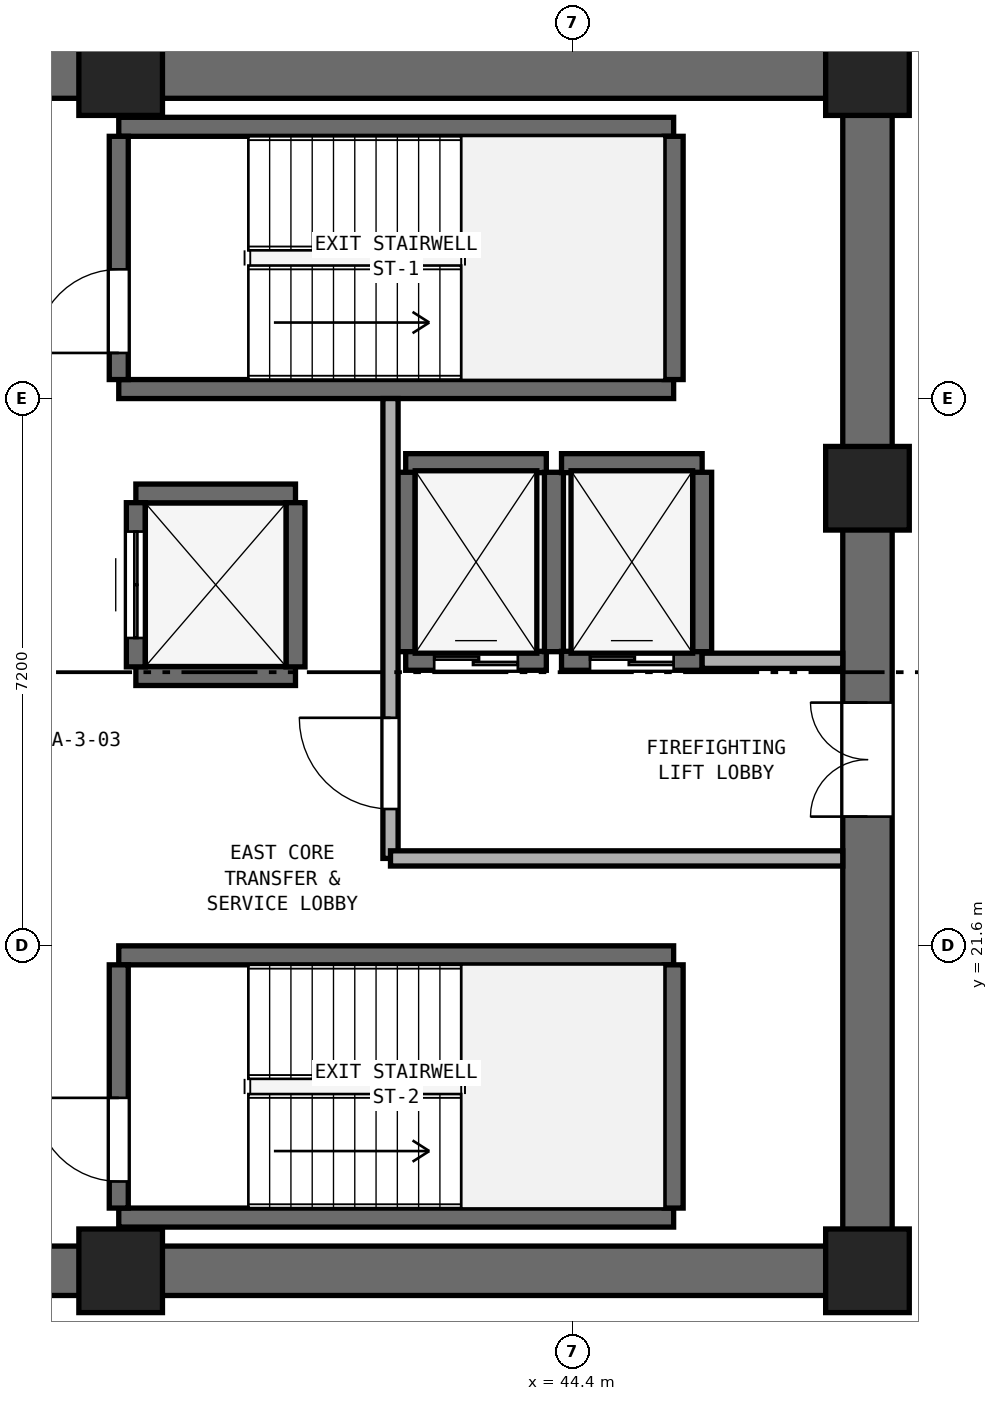
"""IFC4 building model, lengths in metres.
Left out: names, types, materials, properties, quantities, classifications, styles, units other than length and angle.
Written with IfcOpenShell. Run it as: python <this file> out.ifc"""

import sys

from ifc_helpers import new_model, si_unit, direction, frame, frame_2d, origin, origin_2d, place, context, subcontext, project, spatial, rectangle, extrude, element, fill, save


model = new_model("IFC4")
c1 = context("Model", 3, precision=1e-05, world=origin(), true_north=direction((0.0, 1.0)))
c2 = subcontext(c1, "Body", "Model", "MODEL_VIEW")
j1 = project(units=[si_unit("LENGTHUNIT", "METRE"), si_unit("PLANEANGLEUNIT", "RADIAN")], contexts=[c1])
p1 = place(None, origin())
s1 = spatial("IfcSite", under=j1, at=p1, CompositionType="ELEMENT")
p2 = place(p1, origin())
s2 = spatial("IfcBuilding", under=s1, at=p2, CompositionType="ELEMENT")
p3 = place(p2, frame((0.0, 0.0, 93.4)))
s3 = spatial("IfcBuildingStorey", under=s2, at=p3, CompositionType="ELEMENT", Elevation=93.4)
for number, where, z_axis, x_axis in (
    (1, (25.4, 17.325, 0.0), (0.0, 0.0, 1.0), (1.0, 0.0, 0.0)),
    (2, (25.4, 33.075, 0.0), (0.0, 0.0, 1.0), (1.0, 0.0, 0.0)),
):
    element("IfcWall", number, at=place(p3, frame(where, z_axis=z_axis, x_axis=x_axis)), inside=s3, PredefinedType="SHEAR", context=c2, shape_type="SweptSolid", body=[
        extrude(rectangle(XDim=23.2, YDim=0.65, at=frame_2d((11.6, 0.0))), origin(), (0.0, 0.0, 1.0), 3.525),
    ])
p4 = place(p3, frame((48.275, 17.65, 0.0), z_axis=(0.0, 0.0, 1.0), x_axis=(0.0, 1.0, 0.0)))
e3 = element("IfcWall", 3, at=p4, inside=s3, PredefinedType="SHEAR", context=c2, shape_type="SweptSolid", body=[
    extrude(rectangle(XDim=15.1, YDim=0.65, at=frame_2d((7.55, 0.0))), origin(), (0.0, 0.0, 1.0), 3.525),
])
p5 = place(p4, frame((5.65, 0.0, 0.0)))
e4 = element("IfcOpeningElement", 4, at=p5, cuts=e3, PredefinedType="OPENING", context=c2, shape_type="SweptSolid", body=[
    extrude(rectangle(XDim=1.5, YDim=2.15, at=frame_2d((0.75, 1.075))), frame((0.0, 0.335, 0.0), z_axis=(0.0, -1.0, 0.0), x_axis=(1.0, 0.0, 0.0)), (0.0, 0.0, 1.0), 0.67),
])
for number, where, z_axis, x_axis in (
    (5, (38.45, 17.325, 0.0), (0.0, 0.0, 1.0), (1.0, 0.0, 0.0)),
    (6, (48.275, 17.325, 0.0), (0.0, 0.0, 1.0), (1.0, 0.0, 0.0)),
    (7, (48.275, 27.62, 0.0), (0.0, 0.0, 1.0), (1.0, 0.0, 0.0)),
    (8, (48.275, 33.075, 0.0), (0.0, 0.0, 1.0), (1.0, 0.0, 0.0)),
    (9, (38.45, 33.075, 0.0), (0.0, 0.0, 1.0), (1.0, 0.0, 0.0)),
):
    element("IfcColumn", number, at=place(p3, frame(where, z_axis=z_axis, x_axis=x_axis)), inside=s3, PredefinedType="PILASTER", context=c2, shape_type="SweptSolid", body=[
        extrude(rectangle(XDim=1.1, YDim=1.1, at=origin_2d()), origin(), (0.0, 0.0, 1.0), 3.8),
    ])
for number, where, z_axis, x_axis in (
    (10, (38.425, 28.925, 0.0), (0.0, 0.0, 1.0), (1.0, 0.0, 0.0)),
    (11, (38.425, 32.375, 0.0), (0.0, 0.0, 1.0), (1.0, 0.0, 0.0)),
):
    element("IfcWall", number, at=place(p3, frame(where, z_axis=z_axis, x_axis=x_axis)), inside=s3, PredefinedType="SHEAR", context=c2, shape_type="SweptSolid", body=[
        extrude(rectangle(XDim=7.3, YDim=0.25, at=frame_2d((3.65, 0.0))), origin(), (0.0, 0.0, 1.0), 3.525),
    ])
p6 = place(p3, frame((38.425, 29.05, 0.0), z_axis=(0.0, 0.0, 1.0), x_axis=(0.0, 1.0, 0.0)))
e12 = element("IfcWall", 12, at=p6, inside=s3, PredefinedType="SHEAR", context=c2, shape_type="SweptSolid", body=[
    extrude(rectangle(XDim=3.2, YDim=0.25, at=frame_2d((1.6, 0.0))), origin(), (0.0, 0.0, 1.0), 3.525),
])
p7 = place(p6, frame((0.35, 0.0, 0.0)))
e13 = element("IfcOpeningElement", 13, at=p7, cuts=e12, PredefinedType="OPENING", context=c2, shape_type="SweptSolid", body=[
    extrude(rectangle(XDim=1.1, YDim=2.15, at=frame_2d((0.55, 1.075))), frame((0.0, 0.135, 0.0), z_axis=(0.0, -1.0, 0.0), x_axis=(1.0, 0.0, 0.0)), (0.0, 0.0, 1.0), 0.27),
])
p8 = place(p3, frame((45.725, 29.05, 0.0), z_axis=(0.0, 0.0, 1.0), x_axis=(0.0, 1.0, 0.0)))
e14 = element("IfcWall", 14, at=p8, inside=s3, PredefinedType="SHEAR", context=c2, shape_type="SweptSolid", body=[
    extrude(rectangle(XDim=3.2, YDim=0.25, at=frame_2d((1.6, 0.0))), origin(), (0.0, 0.0, 1.0), 3.525),
])
for number, where, z_axis, x_axis in (
    (15, (38.425, 18.025, 0.0), (0.0, 0.0, 1.0), (1.0, 0.0, 0.0)),
    (16, (38.425, 21.475, 0.0), (0.0, 0.0, 1.0), (1.0, 0.0, 0.0)),
):
    element("IfcWall", number, at=place(p3, frame(where, z_axis=z_axis, x_axis=x_axis)), inside=s3, PredefinedType="SHEAR", context=c2, shape_type="SweptSolid", body=[
        extrude(rectangle(XDim=7.3, YDim=0.25, at=frame_2d((3.65, 0.0))), origin(), (0.0, 0.0, 1.0), 3.525),
    ])
p9 = place(p3, frame((38.425, 18.15, 0.0), z_axis=(0.0, 0.0, 1.0), x_axis=(0.0, 1.0, 0.0)))
e17 = element("IfcWall", 17, at=p9, inside=s3, PredefinedType="SHEAR", context=c2, shape_type="SweptSolid", body=[
    extrude(rectangle(XDim=3.2, YDim=0.25, at=frame_2d((1.6, 0.0))), origin(), (0.0, 0.0, 1.0), 3.525),
])
p10 = place(p9, frame((0.35, 0.0, 0.0)))
e18 = element("IfcOpeningElement", 18, at=p10, cuts=e17, PredefinedType="OPENING", context=c2, shape_type="SweptSolid", body=[
    extrude(rectangle(XDim=1.1, YDim=2.15, at=frame_2d((0.55, 1.075))), frame((0.0, 0.135, 0.0), z_axis=(0.0, -1.0, 0.0), x_axis=(1.0, 0.0, 0.0)), (0.0, 0.0, 1.0), 0.27),
])
p11 = place(p3, frame((45.725, 18.15, 0.0), z_axis=(0.0, 0.0, 1.0), x_axis=(0.0, 1.0, 0.0)))
e19 = element("IfcWall", 19, at=p11, inside=s3, PredefinedType="SHEAR", context=c2, shape_type="SweptSolid", body=[
    extrude(rectangle(XDim=3.2, YDim=0.25, at=frame_2d((1.6, 0.0))), origin(), (0.0, 0.0, 1.0), 3.525),
])
p12 = place(p3, frame((42.2, 25.35, 0.0), z_axis=(0.0, 0.0, 1.0), x_axis=(1.0, 0.0, 0.0)))
e20 = element("IfcWall", 20, at=p12, inside=s3, PredefinedType="SHEAR", context=c2, shape_type="SweptSolid", body=[
    extrude(rectangle(XDim=1.85, YDim=0.25, at=frame_2d((0.925, 0.0))), origin(), (0.0, 0.0, 1.0), 3.525),
])
p13 = place(p12, frame((0.375, 0.0, 0.0)))
e21 = element("IfcOpeningElement", 21, at=p13, cuts=e20, PredefinedType="OPENING", context=c2, shape_type="SweptSolid", body=[
    extrude(rectangle(XDim=1.1, YDim=2.15, at=frame_2d((0.55, 1.075))), frame((0.0, 0.135, 0.0), z_axis=(0.0, -1.0, 0.0), x_axis=(1.0, 0.0, 0.0)), (0.0, 0.0, 1.0), 0.27),
])
p14 = place(p3, frame((42.2, 27.95, 0.0), z_axis=(0.0, 0.0, 1.0), x_axis=(1.0, 0.0, 0.0)))
e22 = element("IfcWall", 22, at=p14, inside=s3, PredefinedType="SHEAR", context=c2, shape_type="SweptSolid", body=[
    extrude(rectangle(XDim=1.85, YDim=0.25, at=frame_2d((0.925, 0.0))), origin(), (0.0, 0.0, 1.0), 3.525),
])
for number, where, z_axis, x_axis in (
    (23, (42.2, 25.47, 0.0), (0.0, 0.0, 1.0), (0.0, 1.0, 0.0)),
    (24, (44.15, 25.47, 0.0), (0.0, 0.0, 1.0), (0.0, 1.0, 0.0)),
):
    element("IfcWall", number, at=place(p3, frame(where, z_axis=z_axis, x_axis=x_axis)), inside=s3, PredefinedType="SHEAR", context=c2, shape_type="SweptSolid", body=[
        extrude(rectangle(XDim=2.36, YDim=0.25, at=frame_2d((1.18, 0.0))), origin(), (0.0, 0.0, 1.0), 3.525),
    ])
p15 = place(p3, frame((44.25, 25.35, 0.0), z_axis=(0.0, 0.0, 1.0), x_axis=(1.0, 0.0, 0.0)))
e25 = element("IfcWall", 25, at=p15, inside=s3, PredefinedType="SHEAR", context=c2, shape_type="SweptSolid", body=[
    extrude(rectangle(XDim=1.85, YDim=0.25, at=frame_2d((0.925, 0.0))), origin(), (0.0, 0.0, 1.0), 3.525),
])
p16 = place(p15, frame((0.375, 0.0, 0.0)))
e26 = element("IfcOpeningElement", 26, at=p16, cuts=e25, PredefinedType="OPENING", context=c2, shape_type="SweptSolid", body=[
    extrude(rectangle(XDim=1.1, YDim=2.15, at=frame_2d((0.55, 1.075))), frame((0.0, 0.135, 0.0), z_axis=(0.0, -1.0, 0.0), x_axis=(1.0, 0.0, 0.0)), (0.0, 0.0, 1.0), 0.27),
])
p17 = place(p3, frame((44.25, 27.95, 0.0), z_axis=(0.0, 0.0, 1.0), x_axis=(1.0, 0.0, 0.0)))
e27 = element("IfcWall", 27, at=p17, inside=s3, PredefinedType="SHEAR", context=c2, shape_type="SweptSolid", body=[
    extrude(rectangle(XDim=1.85, YDim=0.25, at=frame_2d((0.925, 0.0))), origin(), (0.0, 0.0, 1.0), 3.525),
])
p18 = place(p3, frame((46.1, 25.47, 0.0), z_axis=(0.0, 0.0, 1.0), x_axis=(0.0, 1.0, 0.0)))
e28 = element("IfcWall", 28, at=p18, inside=s3, PredefinedType="SHEAR", context=c2, shape_type="SweptSolid", body=[
    extrude(rectangle(XDim=2.36, YDim=0.25, at=frame_2d((1.18, 0.0))), origin(), (0.0, 0.0, 1.0), 3.525),
])
for number, where, z_axis, x_axis in (
    (29, (38.65, 25.15, 0.0), (0.0, 0.0, 1.0), (1.0, 0.0, 0.0)),
    (30, (38.65, 27.55, 0.0), (0.0, 0.0, 1.0), (1.0, 0.0, 0.0)),
):
    element("IfcWall", number, at=place(p3, frame(where, z_axis=z_axis, x_axis=x_axis)), inside=s3, PredefinedType="SHEAR", context=c2, shape_type="SweptSolid", body=[
        extrude(rectangle(XDim=2.1, YDim=0.25, at=frame_2d((1.05, 0.0))), origin(), (0.0, 0.0, 1.0), 3.525),
    ])
p19 = place(p3, frame((38.65, 25.27, 0.0), z_axis=(0.0, 0.0, 1.0), x_axis=(0.0, 1.0, 0.0)))
e31 = element("IfcWall", 31, at=p19, inside=s3, PredefinedType="SHEAR", context=c2, shape_type="SweptSolid", body=[
    extrude(rectangle(XDim=2.16, YDim=0.25, at=frame_2d((1.08, 0.0))), origin(), (0.0, 0.0, 1.0), 3.525),
])
p20 = place(p19, frame((0.38, 0.0, 0.0)))
e32 = element("IfcOpeningElement", 32, at=p20, cuts=e31, PredefinedType="OPENING", context=c2, shape_type="SweptSolid", body=[
    extrude(rectangle(XDim=1.4, YDim=2.2, at=frame_2d((0.7, 1.1))), frame((0.0, 0.135, 0.0), z_axis=(0.0, -1.0, 0.0), x_axis=(1.0, 0.0, 0.0)), (0.0, 0.0, 1.0), 0.27),
])
p21 = place(p3, frame((40.75, 25.27, 0.0), z_axis=(0.0, 0.0, 1.0), x_axis=(0.0, 1.0, 0.0)))
e33 = element("IfcWall", 33, at=p21, inside=s3, PredefinedType="SHEAR", context=c2, shape_type="SweptSolid", body=[
    extrude(rectangle(XDim=2.16, YDim=0.25, at=frame_2d((1.08, 0.0))), origin(), (0.0, 0.0, 1.0), 3.525),
])
p22 = place(p3, frame((42.0, 22.75, 0.0), z_axis=(0.0, 0.0, 1.0), x_axis=(0.0, 1.0, 0.0)))
e34 = element("IfcWall", 34, at=p22, inside=s3, PredefinedType="SOLIDWALL", context=c2, shape_type="SweptSolid", body=[
    extrude(rectangle(XDim=6.05, YDim=0.2, at=frame_2d((3.025, 0.0))), origin(), (0.0, 0.0, 1.0), 3.525),
])
p23 = place(p22, frame((0.65, 0.0, 0.0)))
e35 = element("IfcOpeningElement", 35, at=p23, cuts=e34, PredefinedType="OPENING", context=c2, shape_type="SweptSolid", body=[
    extrude(rectangle(XDim=1.2, YDim=2.15, at=frame_2d((0.6, 1.075))), frame((0.0, 0.11, 0.0), z_axis=(0.0, -1.0, 0.0), x_axis=(1.0, 0.0, 0.0)), (0.0, 0.0, 1.0), 0.22),
])
p24 = place(p3, frame((42.0, 22.75, 0.0), z_axis=(0.0, 0.0, 1.0), x_axis=(1.0, 0.0, 0.0)))
e36 = element("IfcWall", 36, at=p24, inside=s3, PredefinedType="SOLIDWALL", context=c2, shape_type="SweptSolid", body=[
    extrude(rectangle(XDim=5.95, YDim=0.2, at=frame_2d((2.975, 0.0))), origin(), (0.0, 0.0, 1.0), 3.525),
])
p25 = place(p3, frame((46.1, 25.35, 0.0), z_axis=(0.0, 0.0, 1.0), x_axis=(1.0, 0.0, 0.0)))
e37 = element("IfcWall", 37, at=p25, inside=s3, PredefinedType="SOLIDWALL", context=c2, shape_type="SweptSolid", body=[
    extrude(rectangle(XDim=1.85, YDim=0.2, at=frame_2d((0.925, 0.0))), origin(), (0.0, 0.0, 1.0), 3.525),
])
p26 = place(p7, origin())
e38 = element("IfcDoor", 38, at=p26, inside=s3, OperationType="SINGLE_SWING_LEFT", PredefinedType="DOOR", context=c2, shape_type="SweptSolid", body=[
    extrude(rectangle(XDim=1.1, YDim=2.15, at=frame_2d((0.55, 1.075))), frame((0.0, 0.025, 0.0), z_axis=(0.0, -1.0, 0.0), x_axis=(1.0, 0.0, 0.0)), (0.0, 0.0, 1.0), 0.05),
])
fill(e13, e38)
p27 = place(p10, origin())
e39 = element("IfcDoor", 39, at=p27, inside=s3, OperationType="SINGLE_SWING_RIGHT", PredefinedType="DOOR", context=c2, shape_type="SweptSolid", body=[
    extrude(rectangle(XDim=1.1, YDim=2.15, at=frame_2d((0.55, 1.075))), frame((0.0, 0.025, 0.0), z_axis=(0.0, -1.0, 0.0), x_axis=(1.0, 0.0, 0.0)), (0.0, 0.0, 1.0), 0.05),
])
fill(e18, e39)
p28 = place(p13, origin())
e40 = element("IfcDoor", 40, at=p28, inside=s3, OperationType="DOUBLE_DOOR_SLIDING", PredefinedType="DOOR", context=c2, shape_type="SweptSolid", body=[
    extrude(rectangle(XDim=1.1, YDim=2.15, at=frame_2d((0.55, 1.075))), frame((0.0, 0.025, 0.0), z_axis=(0.0, -1.0, 0.0), x_axis=(1.0, 0.0, 0.0)), (0.0, 0.0, 1.0), 0.05),
])
fill(e21, e40)
p29 = place(p16, origin())
e41 = element("IfcDoor", 41, at=p29, inside=s3, OperationType="DOUBLE_DOOR_SLIDING", PredefinedType="DOOR", context=c2, shape_type="SweptSolid", body=[
    extrude(rectangle(XDim=1.1, YDim=2.15, at=frame_2d((0.55, 1.075))), frame((0.0, 0.025, 0.0), z_axis=(0.0, -1.0, 0.0), x_axis=(1.0, 0.0, 0.0)), (0.0, 0.0, 1.0), 0.05),
])
fill(e26, e41)
p30 = place(p20, origin())
e42 = element("IfcDoor", 42, at=p30, inside=s3, OperationType="DOUBLE_DOOR_SLIDING", PredefinedType="DOOR", context=c2, shape_type="SweptSolid", body=[
    extrude(rectangle(XDim=1.4, YDim=2.2, at=frame_2d((0.7, 1.1))), frame((0.0, 0.025, 0.0), z_axis=(0.0, -1.0, 0.0), x_axis=(1.0, 0.0, 0.0)), (0.0, 0.0, 1.0), 0.05),
])
fill(e32, e42)
p31 = place(p23, origin())
e43 = element("IfcDoor", 43, at=p31, inside=s3, OperationType="SINGLE_SWING_RIGHT", PredefinedType="DOOR", context=c2, shape_type="SweptSolid", body=[
    extrude(rectangle(XDim=1.2, YDim=2.15, at=frame_2d((0.6, 1.075))), frame((0.0, 0.025, 0.0), z_axis=(0.0, -1.0, 0.0), x_axis=(1.0, 0.0, 0.0)), (0.0, 0.0, 1.0), 0.05),
])
fill(e35, e43)
p32 = place(p5, origin())
e44 = element("IfcDoor", 44, at=p32, inside=s3, OperationType="DOUBLE_DOOR_SINGLE_SWING", PredefinedType="DOOR", context=c2, shape_type="SweptSolid", body=[
    extrude(rectangle(XDim=1.5, YDim=2.15, at=frame_2d((0.75, 1.075))), frame((0.0, 0.025, 0.0), z_axis=(0.0, -1.0, 0.0), x_axis=(1.0, 0.0, 0.0)), (0.0, 0.0, 1.0), 0.05),
])
fill(e4, e44)
save(model, sys.argv[1])
